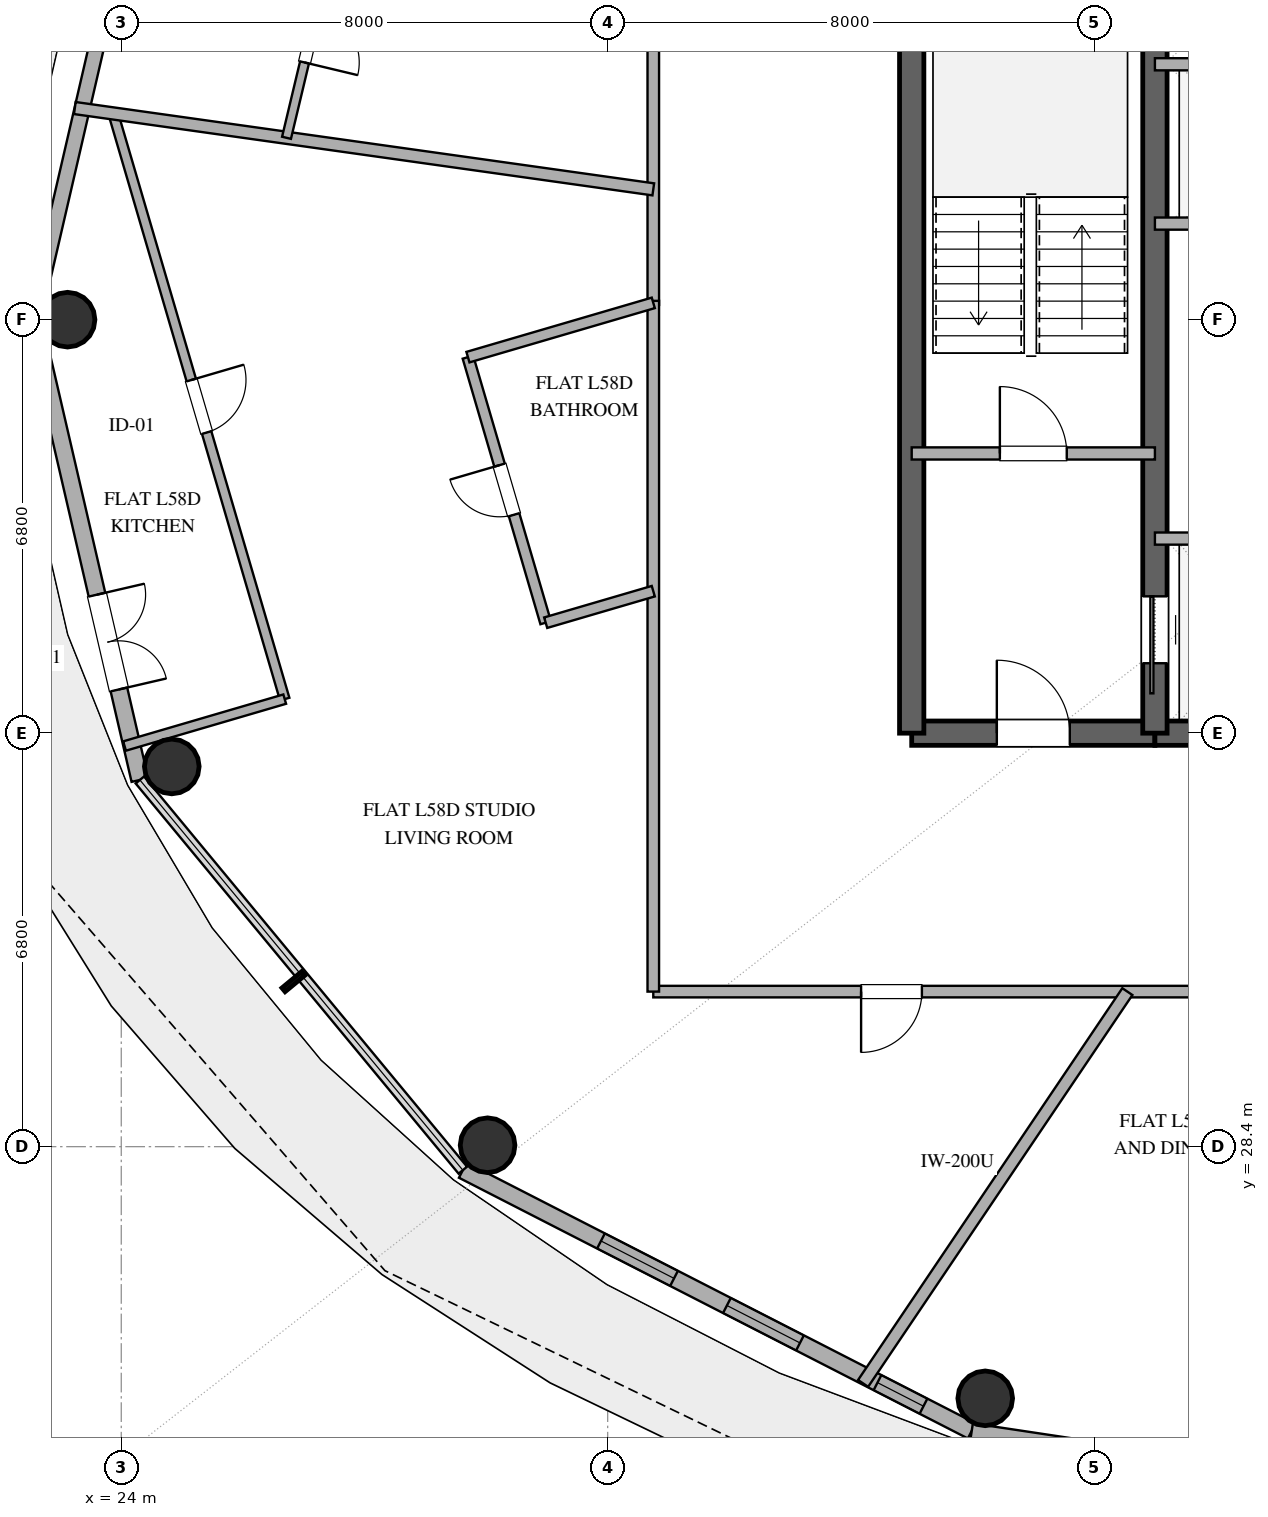
"""IFC4 building model, lengths in metres.
Left out: names, types, materials, properties, quantities, classifications, styles, units other than length and angle.
Written with IfcOpenShell. Run it as: python <this file> out.ifc"""

import sys

from ifc_helpers import new_model, si_unit, direction, frame, frame_2d, origin, origin_2d, place, context, subcontext, project, spatial, rectangle, hollow_circle, extrude, element, fill, save


model = new_model("IFC4")
c1 = context("Model", 3, precision=1e-05, world=origin(), true_north=direction((0.0, 1.0)))
c2 = subcontext(c1, "Body", "Model", "MODEL_VIEW")
j1 = project(units=[si_unit("LENGTHUNIT", "METRE"), si_unit("PLANEANGLEUNIT", "RADIAN")], contexts=[c1])
p1 = place(None, origin())
s1 = spatial("IfcSite", under=j1, at=p1, CompositionType="ELEMENT")
p2 = place(p1, origin())
s2 = spatial("IfcBuilding", under=s1, at=p2, CompositionType="ELEMENT")
p3 = place(p2, frame((0.0, 0.0, 228.0)))
s3 = spatial("IfcBuildingStorey", under=s2, at=p3, CompositionType="ELEMENT", Elevation=228.0)
p4 = place(p3, frame((37.0, 35.2, 0.0), z_axis=(0.0, 0.0, 1.0), x_axis=(1.0, 0.0, 0.0)))
e1 = element("IfcWall", 1, at=p4, inside=s3, PredefinedType="SHEAR", context=c2, shape_type="SweptSolid", body=[
    extrude(rectangle(XDim=4.0, YDim=0.4, at=frame_2d((2.0, 0.0))), origin(), (0.0, 0.0, 1.0), 3.36),
])
p5 = place(p4, frame((1.4, 0.0, 0.0)))
e2 = element("IfcOpeningElement", 2, at=p5, cuts=e1, PredefinedType="OPENING", context=c2, shape_type="SweptSolid", body=[
    extrude(rectangle(XDim=1.2, YDim=2.15, at=frame_2d((0.6, 1.075))), frame((0.0, 0.21, 0.0), z_axis=(0.0, -1.0, 0.0), x_axis=(1.0, 0.0, 0.0)), (0.0, 0.0, 1.0), 0.42),
])
p6 = place(p3, frame((41.0, 35.2, 0.0), z_axis=(0.0, 0.0, 1.0), x_axis=(1.0, 0.0, 0.0)))
e3 = element("IfcWall", 3, at=p6, inside=s3, PredefinedType="SHEAR", context=c2, shape_type="SweptSolid", body=[
    extrude(rectangle(XDim=14.0, YDim=0.4, at=frame_2d((7.0, 0.0))), origin(), (0.0, 0.0, 1.0), 3.36),
])
p7 = place(p6, frame((6.1, 0.0, 0.0)))
e4 = element("IfcOpeningElement", 4, at=p7, cuts=e3, PredefinedType="OPENING", context=c2, shape_type="SweptSolid", body=[
    extrude(rectangle(XDim=1.8, YDim=2.25, at=frame_2d((0.9, 1.125))), frame((0.0, 0.21, 0.0), z_axis=(0.0, -1.0, 0.0), x_axis=(1.0, 0.0, 0.0)), (0.0, 0.0, 1.0), 0.42),
])
p8 = place(p3, frame((37.0, 35.2, 0.0), z_axis=(0.0, 0.0, 1.0), x_axis=(0.0, 1.0, 0.0)))
e5 = element("IfcWall", 5, at=p8, inside=s3, PredefinedType="SHEAR", context=c2, shape_type="SweptSolid", body=[
    extrude(rectangle(XDim=13.6, YDim=0.4, at=frame_2d((6.8, 0.0))), origin(), (0.0, 0.0, 1.0), 3.36),
])
p9 = place(p3, frame((41.0, 35.2, 0.0), z_axis=(0.0, 0.0, 1.0), x_axis=(0.0, 1.0, 0.0)))
e6 = element("IfcWall", 6, at=p9, inside=s3, PredefinedType="SHEAR", context=c2, shape_type="SweptSolid", body=[
    extrude(rectangle(XDim=13.6, YDim=0.4, at=frame_2d((6.8, 0.0))), origin(), (0.0, 0.0, 1.0), 3.36),
])
p10 = place(p9, frame((1.15, 0.0, 0.0)))
e7 = element("IfcOpeningElement", 7, at=p10, cuts=e6, PredefinedType="OPENING", context=c2, shape_type="SweptSolid", body=[
    extrude(rectangle(XDim=1.1, YDim=2.2, at=frame_2d((0.55, 1.1))), frame((0.0, 0.21, 0.0), z_axis=(0.0, -1.0, 0.0), x_axis=(1.0, 0.0, 0.0)), (0.0, 0.0, 1.0), 0.42),
])
for number, where, z_axis, x_axis in (
    (8, (23.117, 42.0, 0.0), (0.0, 0.0, 1.0), (1.0, 0.0, 0.0)),
    (9, (24.831, 34.653, 0.0), (0.0, 0.0, 1.0), (1.0, 0.0, 0.0)),
    (10, (30.025, 28.424, 0.0), (0.0, 0.0, 1.0), (1.0, 0.0, 0.0)),
    (11, (38.209, 24.261, 0.0), (0.0, 0.0, 1.0), (1.0, 0.0, 0.0)),
):
    element("IfcColumn", number, at=place(p3, frame(where, z_axis=z_axis, x_axis=x_axis)), inside=s3, PredefinedType="COLUMN", context=c2, shape_type="SweptSolid", body=[
        extrude(hollow_circle(Radius=0.45, WallThickness=0.025, at=origin_2d()), origin(), (0.0, 0.0, 1.0), 3.36),
    ])
p11 = place(p3, frame((24.306, 49.57, 0.0), z_axis=(0.0, 0.0, 1.0), x_axis=(-0.225635078214, -0.974211892495, 0.0)))
e12 = element("IfcWall", 12, at=p11, inside=s3, PredefinedType="SOLIDWALL", context=c2, shape_type="SweptSolid", body=[
    extrude(rectangle(XDim=7.77, YDim=0.25, at=frame_2d((3.885, 0.0))), origin(), (0.0, 0.0, 1.0), 3.36),
])
p12 = place(p3, frame((22.553, 42.0, 0.0), z_axis=(0.0, 0.0, 1.0), x_axis=(0.225635078214, -0.974211892495, 0.0)))
e13 = element("IfcWall", 13, at=p12, inside=s3, PredefinedType="SOLIDWALL", context=c2, shape_type="SweptSolid", body=[
    extrude(rectangle(XDim=7.77, YDim=0.28, at=frame_2d((3.885, 0.0))), origin(), (0.0, 0.0, 1.0), 3.36),
])
p13 = place(p12, frame((4.642, 0.0, 0.0)))
e14 = element("IfcOpeningElement", 14, at=p13, cuts=e13, PredefinedType="OPENING", context=c2, shape_type="SweptSolid", body=[
    extrude(rectangle(XDim=1.6, YDim=2.25, at=frame_2d((0.8, 1.125))), frame((0.0, 0.15, 0.0), z_axis=(0.0, -1.0, 0.0), x_axis=(1.0, 0.0, 0.0)), (0.0, 0.0, 1.0), 0.3),
])
p14 = place(p3, frame((29.617, 28.013, 0.0), z_axis=(0.0, 0.0, 1.0), x_axis=(0.890007394051, -0.455946091699, 0.0)))
e15 = element("IfcWall", 15, at=p14, inside=s3, PredefinedType="SOLIDWALL", context=c2, shape_type="SweptSolid", body=[
    extrude(rectangle(XDim=9.404, YDim=0.28, at=frame_2d((4.702, 0.0))), origin(), (0.0, 0.0, 1.0), 3.36),
])
p15 = place(p14, frame((2.553, 0.0, 0.85)))
e16 = element("IfcOpeningElement", 16, at=p15, cuts=e15, PredefinedType="OPENING", context=c2, shape_type="SweptSolid", body=[
    extrude(rectangle(XDim=1.35, YDim=1.8, at=frame_2d((0.675, 0.9))), frame((0.0, 0.15, 0.0), z_axis=(0.0, -1.0, 0.0), x_axis=(1.0, 0.0, 0.0)), (0.0, 0.0, 1.0), 0.3),
])
p16 = place(p14, frame((4.88, 0.0, 0.85)))
e17 = element("IfcOpeningElement", 17, at=p16, cuts=e15, PredefinedType="OPENING", context=c2, shape_type="SweptSolid", body=[
    extrude(rectangle(XDim=1.35, YDim=1.8, at=frame_2d((0.675, 0.9))), frame((0.0, 0.15, 0.0), z_axis=(0.0, -1.0, 0.0), x_axis=(1.0, 0.0, 0.0)), (0.0, 0.0, 1.0), 0.3),
])
p17 = place(p14, frame((7.663, 0.0, 0.85)))
e18 = element("IfcOpeningElement", 18, at=p17, cuts=e15, PredefinedType="OPENING", context=c2, shape_type="SweptSolid", body=[
    extrude(rectangle(XDim=0.85, YDim=1.8, at=frame_2d((0.425, 0.9))), frame((0.0, 0.15, 0.0), z_axis=(0.0, -1.0, 0.0), x_axis=(1.0, 0.0, 0.0)), (0.0, 0.0, 1.0), 0.3),
])
p18 = place(p3, frame((37.987, 23.726, 0.0), z_axis=(0.0, 0.0, 1.0), x_axis=(0.988882522213, -0.148698881169, 0.0)))
e19 = element("IfcWall", 19, at=p18, inside=s3, PredefinedType="SOLIDWALL", context=c2, shape_type="SweptSolid", body=[
    extrude(rectangle(XDim=10.125, YDim=0.25, at=frame_2d((5.062, 0.0))), origin(), (0.0, 0.0, 1.0), 3.36),
])
p19 = place(p18, frame((8.259, 0.0, 0.35)))
e20 = element("IfcOpeningElement", 20, at=p19, cuts=e19, PredefinedType="OPENING", context=c2, shape_type="SweptSolid", body=[
    extrude(rectangle(XDim=1.0, YDim=1.05, at=frame_2d((0.5, 0.525))), frame((0.0, 0.135, 0.0), z_axis=(0.0, -1.0, 0.0), x_axis=(1.0, 0.0, 0.0)), (0.0, 0.0, 1.0), 0.27),
])
p20 = place(p3, frame((37.0, 39.8, 0.0), z_axis=(0.0, 0.0, 1.0), x_axis=(1.0, 0.0, 0.0)))
e21 = element("IfcWall", 21, at=p20, inside=s3, PredefinedType="SOLIDWALL", context=c2, shape_type="SweptSolid", body=[
    extrude(rectangle(XDim=4.0, YDim=0.2, at=frame_2d((2.0, 0.0))), origin(), (0.0, 0.0, 1.0), 2.72),
])
p21 = place(p20, frame((1.45, 0.0, 0.0)))
e22 = element("IfcOpeningElement", 22, at=p21, cuts=e21, PredefinedType="OPENING", context=c2, shape_type="SweptSolid", body=[
    extrude(rectangle(XDim=1.1, YDim=2.15, at=frame_2d((0.55, 1.075))), frame((0.0, 0.11, 0.0), z_axis=(0.0, -1.0, 0.0), x_axis=(1.0, 0.0, 0.0)), (0.0, 0.0, 1.0), 0.22),
])
for number, where, z_axis, x_axis in (
    (23, (41.0, 38.4, 0.0), (0.0, 0.0, 1.0), (1.0, 0.0, 0.0)),
    (24, (41.0, 46.2, 0.0), (0.0, 0.0, 1.0), (1.0, 0.0, 0.0)),
    (25, (41.0, 43.58, 0.0), (0.0, 0.0, 1.0), (1.0, 0.0, 0.0)),
):
    element("IfcWall", number, at=place(p3, frame(where, z_axis=z_axis, x_axis=x_axis)), inside=s3, PredefinedType="SOLIDWALL", context=c2, shape_type="SweptSolid", body=[
        extrude(rectangle(XDim=2.95, YDim=0.2, at=frame_2d((1.475, 0.0))), origin(), (0.0, 0.0, 1.0), 2.72),
    ])
p22 = place(p3, frame((23.868, 45.392, 0.0), z_axis=(0.0, 0.0, 1.0), x_axis=(0.281018983641, -0.959702209455, 0.0)))
e26 = element("IfcWall", 26, at=p22, inside=s3, PredefinedType="PLUMBINGWALL", context=c2, shape_type="SweptSolid", body=[
    extrude(rectangle(XDim=10.036, YDim=0.16, at=frame_2d((5.018, 0.0))), origin(), (0.0, 0.0, 1.0), 2.72),
])
p23 = place(p22, frame((4.568, 0.0, 0.0)))
e27 = element("IfcOpeningElement", 27, at=p23, cuts=e26, PredefinedType="OPENING", context=c2, shape_type="SweptSolid", body=[
    extrude(rectangle(XDim=0.9, YDim=2.1, at=frame_2d((0.45, 1.05))), frame((0.0, 0.09, 0.0), z_axis=(0.0, -1.0, 0.0), x_axis=(1.0, 0.0, 0.0)), (0.0, 0.0, 1.0), 0.18),
])
p24 = place(p3, frame((32.75, 42.243, 0.0), z_axis=(0.0, 0.0, 1.0), x_axis=(0.0, 1.0, 0.0)))
e28 = element("IfcWall", 28, at=p24, inside=s3, PredefinedType="PARTITIONING", context=c2, shape_type="SweptSolid", body=[
    extrude(rectangle(XDim=10.807, YDim=0.19, at=frame_2d((5.404, 0.0))), origin(), (0.0, 0.0, 1.0), 2.72),
])
p25 = place(p24, frame((5.837, 0.0, 0.0)))
e29 = element("IfcOpeningElement", 29, at=p25, cuts=e28, PredefinedType="OPENING", context=c2, shape_type="SweptSolid", body=[
    extrude(rectangle(XDim=1.0, YDim=2.2, at=frame_2d((0.5, 1.1))), frame((0.0, 0.105, 0.0), z_axis=(0.0, -1.0, 0.0), x_axis=(1.0, 0.0, 0.0)), (0.0, 0.0, 1.0), 0.21),
])
p26 = place(p3, frame((51.226, 30.95, 0.0), z_axis=(0.0, 0.0, 1.0), x_axis=(-1.0, 0.0, 0.0)))
e30 = element("IfcWall", 30, at=p26, inside=s3, PredefinedType="PARTITIONING", context=c2, shape_type="SweptSolid", body=[
    extrude(rectangle(XDim=18.476, YDim=0.19, at=frame_2d((9.238, 0.0))), origin(), (0.0, 0.0, 1.0), 2.72),
])
p27 = place(p26, frame((14.058, 0.0, 0.0)))
e31 = element("IfcOpeningElement", 31, at=p27, cuts=e30, PredefinedType="OPENING", context=c2, shape_type="SweptSolid", body=[
    extrude(rectangle(XDim=1.0, YDim=2.2, at=frame_2d((0.5, 1.1))), frame((0.0, 0.105, 0.0), z_axis=(0.0, -1.0, 0.0), x_axis=(1.0, 0.0, 0.0)), (0.0, 0.0, 1.0), 0.21),
])
p28 = place(p26, frame((6.839, 0.0, 0.0)))
e32 = element("IfcOpeningElement", 32, at=p28, cuts=e30, PredefinedType="OPENING", context=c2, shape_type="SweptSolid", body=[
    extrude(rectangle(XDim=1.0, YDim=2.2, at=frame_2d((0.5, 1.1))), frame((0.0, 0.105, 0.0), z_axis=(0.0, -1.0, 0.0), x_axis=(1.0, 0.0, 0.0)), (0.0, 0.0, 1.0), 0.21),
])
p29 = place(p3, frame((36.201, 24.507, 0.0), z_axis=(0.0, 0.0, 1.0), x_axis=(0.559208454265, 0.8290270832, 0.0)))
e33 = element("IfcWall", 33, at=p29, inside=s3, PredefinedType="PARTITIONING", context=c2, shape_type="SweptSolid", body=[
    extrude(rectangle(XDim=7.771, YDim=0.2, at=frame_2d((3.886, 0.0))), origin(), (0.0, 0.0, 1.0), 2.72),
])
p30 = place(p3, frame((32.75, 30.95, 0.0), z_axis=(0.0, 0.0, 1.0), x_axis=(0.0, 1.0, 0.0)))
e34 = element("IfcWall", 34, at=p30, inside=s3, PredefinedType="PARTITIONING", context=c2, shape_type="SweptSolid", body=[
    extrude(rectangle(XDim=11.36, YDim=0.19, at=frame_2d((5.68, 0.0))), origin(), (0.0, 0.0, 1.0), 2.72),
])
p31 = place(p3, frame((23.237, 45.48, 0.0), z_axis=(0.0, 0.0, 1.0), x_axis=(0.990269661234, -0.139161769316, 0.0)))
e35 = element("IfcWall", 35, at=p31, inside=s3, PredefinedType="PARTITIONING", context=c2, shape_type="SweptSolid", body=[
    extrude(rectangle(XDim=9.607, YDim=0.2, at=frame_2d((4.803, 0.0))), origin(), (0.0, 0.0, 1.0), 2.72),
])
p32 = place(p3, frame((30.98, 37.017, 0.0), z_axis=(0.0, 0.0, 1.0), x_axis=(-0.281021691617, 0.959701416504, 0.0)))
e36 = element("IfcWall", 36, at=p32, inside=s3, PredefinedType="PLUMBINGWALL", context=c2, shape_type="SweptSolid", body=[
    extrude(rectangle(XDim=4.551, YDim=0.18, at=frame_2d((2.275, 0.0))), origin(), (0.0, 0.0, 1.0), 2.72),
])
p33 = place(p32, frame((1.85, 0.0, 0.0)))
e37 = element("IfcOpeningElement", 37, at=p33, cuts=e36, PredefinedType="OPENING", context=c2, shape_type="SweptSolid", body=[
    extrude(rectangle(XDim=0.85, YDim=2.1, at=frame_2d((0.425, 1.05))), frame((0.0, 0.1, 0.0), z_axis=(0.0, -1.0, 0.0), x_axis=(1.0, 0.0, 0.0)), (0.0, 0.0, 1.0), 0.2),
])
p34 = place(p3, frame((27.519, 48.345, 0.0), z_axis=(0.0, 0.0, 1.0), x_axis=(-0.232293676314, -0.97264569497, 0.0)))
e38 = element("IfcWall", 38, at=p34, inside=s3, PredefinedType="PARTITIONING", context=c2, shape_type="SweptSolid", body=[
    extrude(rectangle(XDim=3.448, YDim=0.15, at=frame_2d((1.724, 0.0))), origin(), (0.0, 0.0, 1.0), 2.72),
])
p35 = place(p34, frame((1.274, 0.0, 0.0)))
e39 = element("IfcOpeningElement", 39, at=p35, cuts=e38, PredefinedType="OPENING", context=c2, shape_type="SweptSolid", body=[
    extrude(rectangle(XDim=0.9, YDim=2.1, at=frame_2d((0.45, 1.05))), frame((0.0, 0.085, 0.0), z_axis=(0.0, -1.0, 0.0), x_axis=(1.0, 0.0, 0.0)), (0.0, 0.0, 1.0), 0.17),
])
p36 = place(p3, frame((29.702, 41.384, 0.0), z_axis=(0.0, 0.0, 1.0), x_axis=(0.959705055225, 0.281009264929, 0.0)))
e40 = element("IfcWall", 40, at=p36, inside=s3, PredefinedType="PLUMBINGWALL", context=c2, shape_type="SweptSolid", body=[
    extrude(rectangle(XDim=3.176, YDim=0.18, at=frame_2d((1.588, 0.0))), origin(), (0.0, 0.0, 1.0), 2.72),
])
p37 = place(p3, frame((26.688, 35.76, 0.0), z_axis=(0.0, 0.0, 1.0), x_axis=(-0.959690607454, -0.281058602368, 0.0)))
e41 = element("IfcWall", 41, at=p37, inside=s3, PredefinedType="PLUMBINGWALL", context=c2, shape_type="SweptSolid", body=[
    extrude(rectangle(XDim=2.745, YDim=0.16, at=frame_2d((1.373, 0.0))), origin(), (0.0, 0.0, 1.0), 2.72),
])
p38 = place(p3, frame((32.75, 37.535, 0.0), z_axis=(0.0, 0.0, 1.0), x_axis=(-0.959679055102, -0.281098045527, 0.0)))
e42 = element("IfcWall", 42, at=p38, inside=s3, PredefinedType="PLUMBINGWALL", context=c2, shape_type="SweptSolid", body=[
    extrude(rectangle(XDim=1.844, YDim=0.18, at=frame_2d((0.922, 0.0))), origin(), (0.0, 0.0, 1.0), 2.72),
])
p39 = place(p13, origin())
e43 = element("IfcDoor", 43, at=p39, inside=s3, OperationType="DOUBLE_DOOR_SINGLE_SWING", PredefinedType="DOOR", context=c2, shape_type="SweptSolid", body=[
    extrude(rectangle(XDim=1.6, YDim=2.25, at=frame_2d((0.8, 1.125))), frame((0.0, 0.025, 0.0), z_axis=(0.0, -1.0, 0.0), x_axis=(1.0, 0.0, 0.0)), (0.0, 0.0, 1.0), 0.05),
])
fill(e14, e43)
p40 = place(p15, origin())
e44 = element("IfcWindow", 44, at=p40, inside=s3, PartitioningType="SINGLE_PANEL", PredefinedType="WINDOW", context=c2, shape_type="SweptSolid", body=[
    extrude(rectangle(XDim=1.35, YDim=1.8, at=frame_2d((0.675, 0.9))), frame((0.0, 0.03, 0.0), z_axis=(0.0, -1.0, 0.0), x_axis=(1.0, 0.0, 0.0)), (0.0, 0.0, 1.0), 0.06),
])
fill(e16, e44)
p41 = place(p16, origin())
e45 = element("IfcWindow", 45, at=p41, inside=s3, PartitioningType="SINGLE_PANEL", PredefinedType="WINDOW", context=c2, shape_type="SweptSolid", body=[
    extrude(rectangle(XDim=1.35, YDim=1.8, at=frame_2d((0.675, 0.9))), frame((0.0, 0.03, 0.0), z_axis=(0.0, -1.0, 0.0), x_axis=(1.0, 0.0, 0.0)), (0.0, 0.0, 1.0), 0.06),
])
fill(e17, e45)
p42 = place(p17, origin())
e46 = element("IfcWindow", 46, at=p42, inside=s3, PartitioningType="SINGLE_PANEL", PredefinedType="WINDOW", context=c2, shape_type="SweptSolid", body=[
    extrude(rectangle(XDim=0.85, YDim=1.8, at=frame_2d((0.425, 0.9))), frame((0.0, 0.03, 0.0), z_axis=(0.0, -1.0, 0.0), x_axis=(1.0, 0.0, 0.0)), (0.0, 0.0, 1.0), 0.06),
])
fill(e18, e46)
p43 = place(p10, origin())
e47 = element("IfcDoor", 47, at=p43, inside=s3, OperationType="SLIDING_TO_LEFT", PredefinedType="DOOR", context=c2, shape_type="SweptSolid", body=[
    extrude(rectangle(XDim=1.1, YDim=2.2, at=frame_2d((0.55, 1.1))), frame((0.0, 0.025, 0.0), z_axis=(0.0, -1.0, 0.0), x_axis=(1.0, 0.0, 0.0)), (0.0, 0.0, 1.0), 0.05),
])
fill(e7, e47)
p44 = place(p5, origin())
e48 = element("IfcDoor", 48, at=p44, inside=s3, OperationType="SINGLE_SWING_LEFT", PredefinedType="DOOR", context=c2, shape_type="SweptSolid", body=[
    extrude(rectangle(XDim=1.2, YDim=2.15, at=frame_2d((0.6, 1.075))), frame((0.0, 0.025, 0.0), z_axis=(0.0, -1.0, 0.0), x_axis=(1.0, 0.0, 0.0)), (0.0, 0.0, 1.0), 0.05),
])
fill(e2, e48)
p45 = place(p21, origin())
e49 = element("IfcDoor", 49, at=p45, inside=s3, OperationType="SINGLE_SWING_LEFT", PredefinedType="DOOR", context=c2, shape_type="SweptSolid", body=[
    extrude(rectangle(XDim=1.1, YDim=2.15, at=frame_2d((0.55, 1.075))), frame((0.0, 0.025, 0.0), z_axis=(0.0, -1.0, 0.0), x_axis=(1.0, 0.0, 0.0)), (0.0, 0.0, 1.0), 0.05),
])
fill(e22, e49)
p46 = place(p23, origin())
e50 = element("IfcDoor", 50, at=p46, inside=s3, OperationType="SINGLE_SWING_LEFT", PredefinedType="DOOR", context=c2, shape_type="SweptSolid", body=[
    extrude(rectangle(XDim=0.9, YDim=2.1, at=frame_2d((0.45, 1.05))), frame((0.0, 0.025, 0.0), z_axis=(0.0, -1.0, 0.0), x_axis=(1.0, 0.0, 0.0)), (0.0, 0.0, 1.0), 0.05),
])
fill(e27, e50)
p47 = place(p27, origin())
e51 = element("IfcDoor", 51, at=p47, inside=s3, OperationType="SINGLE_SWING_RIGHT", PredefinedType="DOOR", context=c2, shape_type="SweptSolid", body=[
    extrude(rectangle(XDim=1.0, YDim=2.2, at=frame_2d((0.5, 1.1))), frame((0.0, 0.025, 0.0), z_axis=(0.0, -1.0, 0.0), x_axis=(1.0, 0.0, 0.0)), (0.0, 0.0, 1.0), 0.05),
])
fill(e31, e51)
p48 = place(p33, origin())
e52 = element("IfcDoor", 52, at=p48, inside=s3, OperationType="SINGLE_SWING_RIGHT", PredefinedType="DOOR", context=c2, shape_type="SweptSolid", body=[
    extrude(rectangle(XDim=0.85, YDim=2.1, at=frame_2d((0.425, 1.05))), frame((0.0, 0.025, 0.0), z_axis=(0.0, -1.0, 0.0), x_axis=(1.0, 0.0, 0.0)), (0.0, 0.0, 1.0), 0.05),
])
fill(e37, e52)
p49 = place(p35, origin())
e53 = element("IfcDoor", 53, at=p49, inside=s3, OperationType="SINGLE_SWING_RIGHT", PredefinedType="DOOR", context=c2, shape_type="SweptSolid", body=[
    extrude(rectangle(XDim=0.9, YDim=2.1, at=frame_2d((0.45, 1.05))), frame((0.0, 0.025, 0.0), z_axis=(0.0, -1.0, 0.0), x_axis=(1.0, 0.0, 0.0)), (0.0, 0.0, 1.0), 0.05),
])
fill(e39, e53)
save(model, sys.argv[1])
